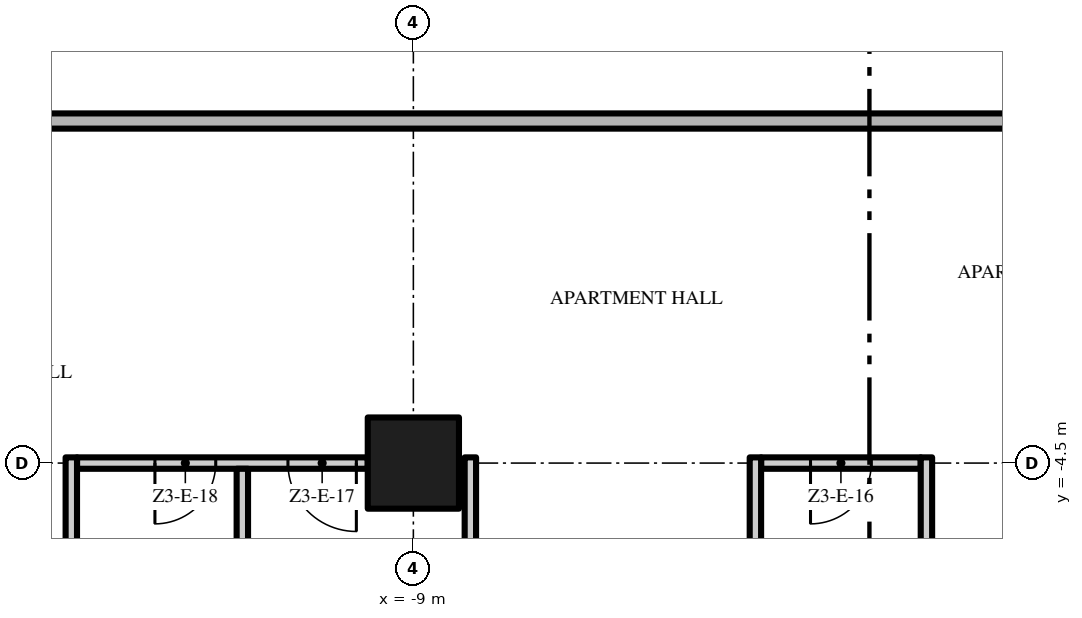
"""IFC4 building model, lengths in metres.
Left out: names, types, materials, properties, quantities, classifications, styles, units other than length and angle.
Written with IfcOpenShell. Run it as: python <this file> out.ifc"""

import sys

from ifc_helpers import new_model, si_unit, direction, frame, frame_2d, origin, origin_2d, place, context, subcontext, project, spatial, rectangle, extrude, element, fill, save


model = new_model("IFC4")
c1 = context("Model", 3, precision=1e-05, world=origin(), true_north=direction((0.0, 1.0)))
c2 = subcontext(c1, "Body", "Model", "MODEL_VIEW")
j1 = project(units=[si_unit("LENGTHUNIT", "METRE"), si_unit("PLANEANGLEUNIT", "RADIAN")], contexts=[c1])
p1 = place(None, origin())
s1 = spatial("IfcSite", under=j1, at=p1, CompositionType="ELEMENT")
p2 = place(p1, origin())
s2 = spatial("IfcBuilding", under=s1, at=p2, CompositionType="ELEMENT")
p3 = place(p2, frame((0.0, 0.0, 166.8)))
s3 = spatial("IfcBuildingStorey", under=s2, at=p3, CompositionType="ELEMENT", Elevation=166.8)
p4 = place(p3, frame((-9.0, -4.5, 0.0), z_axis=(0.0, 0.0, 1.0), x_axis=(1.0, 0.0, 0.0)))
e1 = element("IfcColumn", 1, at=p4, inside=s3, PredefinedType="COLUMN", context=c2, shape_type="SweptSolid", body=[
    extrude(rectangle(XDim=1.2, YDim=1.2, at=origin_2d()), origin(), (0.0, 0.0, 1.0), 3.5),
])
p5 = place(p3, frame((-9.6, -4.5, 0.0), z_axis=(0.0, 0.0, 1.0), x_axis=(-1.0, 0.0, 0.0)))
e2 = element("IfcWall", 2, at=p5, inside=s3, PredefinedType="PARTITIONING", context=c2, shape_type="SweptSolid", body=[
    extrude(rectangle(XDim=3.825, YDim=0.15, at=frame_2d((1.913, 0.0))), origin(), (0.0, 0.0, 1.0), 3.5),
])
p6 = place(p5, frame((0.15, 0.0, 0.0)))
e3 = element("IfcOpeningElement", 3, at=p6, cuts=e2, PredefinedType="OPENING", context=c2, shape_type="SweptSolid", body=[
    extrude(rectangle(XDim=0.9, YDim=2.1, at=frame_2d((0.45, 1.05))), frame((0.0, 0.085, 0.0), z_axis=(0.0, -1.0, 0.0), x_axis=(1.0, 0.0, 0.0)), (0.0, 0.0, 1.0), 0.17),
])
p7 = place(p5, frame((2.0, 0.0, 0.0)))
e4 = element("IfcOpeningElement", 4, at=p7, cuts=e2, PredefinedType="OPENING", context=c2, shape_type="SweptSolid", body=[
    extrude(rectangle(XDim=0.8, YDim=2.0, at=frame_2d((0.4, 1.0))), frame((0.0, 0.085, 0.0), z_axis=(0.0, -1.0, 0.0), x_axis=(1.0, 0.0, 0.0)), (0.0, 0.0, 1.0), 0.17),
])
p8 = place(p3, frame((-2.325, -4.5, 0.0), z_axis=(0.0, 0.0, 1.0), x_axis=(-1.0, 0.0, 0.0)))
e5 = element("IfcWall", 5, at=p8, inside=s3, PredefinedType="PARTITIONING", context=c2, shape_type="SweptSolid", body=[
    extrude(rectangle(XDim=2.1, YDim=0.15, at=frame_2d((1.05, 0.0))), origin(), (0.0, 0.0, 1.0), 3.5),
])
p9 = place(p8, frame((0.65, 0.0, 0.0)))
e6 = element("IfcOpeningElement", 6, at=p9, cuts=e5, PredefinedType="OPENING", context=c2, shape_type="SweptSolid", body=[
    extrude(rectangle(XDim=0.8, YDim=2.0, at=frame_2d((0.4, 1.0))), frame((0.0, 0.085, 0.0), z_axis=(0.0, -1.0, 0.0), x_axis=(1.0, 0.0, 0.0)), (0.0, 0.0, 1.0), 0.17),
])
p10 = place(p3, frame((17.5, 0.0, 0.0), z_axis=(0.0, 0.0, 1.0), x_axis=(-1.0, 0.0, 0.0)))
e7 = element("IfcWall", 7, at=p10, inside=s3, PredefinedType="PARTITIONING", context=c2, shape_type="SweptSolid", body=[
    extrude(rectangle(XDim=35.0, YDim=0.2, at=frame_2d((17.5, 0.0))), origin(), (0.0, 0.0, 1.0), 3.5),
])
p11 = place(p10, frame((16.75, 0.0, 0.0)))
e8 = element("IfcOpeningElement", 8, at=p11, cuts=e7, PredefinedType="OPENING", context=c2, shape_type="SweptSolid", body=[
    extrude(rectangle(XDim=1.5, YDim=2.4, at=frame_2d((0.75, 1.2))), frame((0.0, 0.11, 0.0), z_axis=(0.0, -1.0, 0.0), x_axis=(1.0, 0.0, 0.0)), (0.0, 0.0, 1.0), 0.22),
])
p12 = place(p3, frame((-13.5, -17.7, 0.0), z_axis=(0.0, 0.0, 1.0), x_axis=(0.0, 1.0, 0.0)))
e9 = element("IfcWall", 9, at=p12, inside=s3, PredefinedType="PARTITIONING", context=c2, shape_type="SweptSolid", body=[
    extrude(rectangle(XDim=13.275, YDim=0.15, at=frame_2d((6.638, 0.0))), origin(), (0.0, 0.0, 1.0), 3.5),
])
p13 = place(p3, frame((-11.25, -8.925, 0.0), z_axis=(0.0, 0.0, 1.0), x_axis=(0.0, 1.0, 0.0)))
e10 = element("IfcWall", 10, at=p13, inside=s3, PredefinedType="PARTITIONING", context=c2, shape_type="SweptSolid", body=[
    extrude(rectangle(XDim=4.35, YDim=0.15, at=frame_2d((2.175, 0.0))), origin(), (0.0, 0.0, 1.0), 3.5),
])
p14 = place(p3, frame((-8.25, -8.925, 0.0), z_axis=(0.0, 0.0, 1.0), x_axis=(0.0, 1.0, 0.0)))
e11 = element("IfcWall", 11, at=p14, inside=s3, PredefinedType="PARTITIONING", context=c2, shape_type="SweptSolid", body=[
    extrude(rectangle(XDim=4.5, YDim=0.15, at=frame_2d((2.25, 0.0))), origin(), (0.0, 0.0, 1.0), 3.5),
])
p15 = place(p3, frame((-4.5, -17.7, 0.0), z_axis=(0.0, 0.0, 1.0), x_axis=(0.0, 1.0, 0.0)))
e12 = element("IfcWall", 12, at=p15, inside=s3, PredefinedType="PARTITIONING", context=c2, shape_type="SweptSolid", body=[
    extrude(rectangle(XDim=13.275, YDim=0.15, at=frame_2d((6.638, 0.0))), origin(), (0.0, 0.0, 1.0), 3.5),
])
p16 = place(p3, frame((-2.25, -12.075, 0.0), z_axis=(0.0, 0.0, 1.0), x_axis=(0.0, 1.0, 0.0)))
e13 = element("IfcWall", 13, at=p16, inside=s3, PredefinedType="PARTITIONING", context=c2, shape_type="SweptSolid", body=[
    extrude(rectangle(XDim=7.65, YDim=0.15, at=frame_2d((3.825, 0.0))), origin(), (0.0, 0.0, 1.0), 3.5),
])
p17 = place(p9, origin())
e14 = element("IfcDoor", 14, at=p17, inside=s3, OperationType="SINGLE_SWING_RIGHT", PredefinedType="DOOR", context=c2, shape_type="SweptSolid", body=[
    extrude(rectangle(XDim=0.8, YDim=2.0, at=frame_2d((0.4, 1.0))), frame((0.0, 0.025, 0.0), z_axis=(0.0, -1.0, 0.0), x_axis=(1.0, 0.0, 0.0)), (0.0, 0.0, 1.0), 0.05),
])
fill(e6, e14)
p18 = place(p6, origin())
e15 = element("IfcDoor", 15, at=p18, inside=s3, OperationType="SINGLE_SWING_LEFT", PredefinedType="DOOR", context=c2, shape_type="SweptSolid", body=[
    extrude(rectangle(XDim=0.9, YDim=2.1, at=frame_2d((0.45, 1.05))), frame((0.0, 0.025, 0.0), z_axis=(0.0, -1.0, 0.0), x_axis=(1.0, 0.0, 0.0)), (0.0, 0.0, 1.0), 0.05),
])
fill(e3, e15)
p19 = place(p7, origin())
e16 = element("IfcDoor", 16, at=p19, inside=s3, OperationType="SINGLE_SWING_RIGHT", PredefinedType="DOOR", context=c2, shape_type="SweptSolid", body=[
    extrude(rectangle(XDim=0.8, YDim=2.0, at=frame_2d((0.4, 1.0))), frame((0.0, 0.025, 0.0), z_axis=(0.0, -1.0, 0.0), x_axis=(1.0, 0.0, 0.0)), (0.0, 0.0, 1.0), 0.05),
])
fill(e4, e16)
save(model, sys.argv[1])
